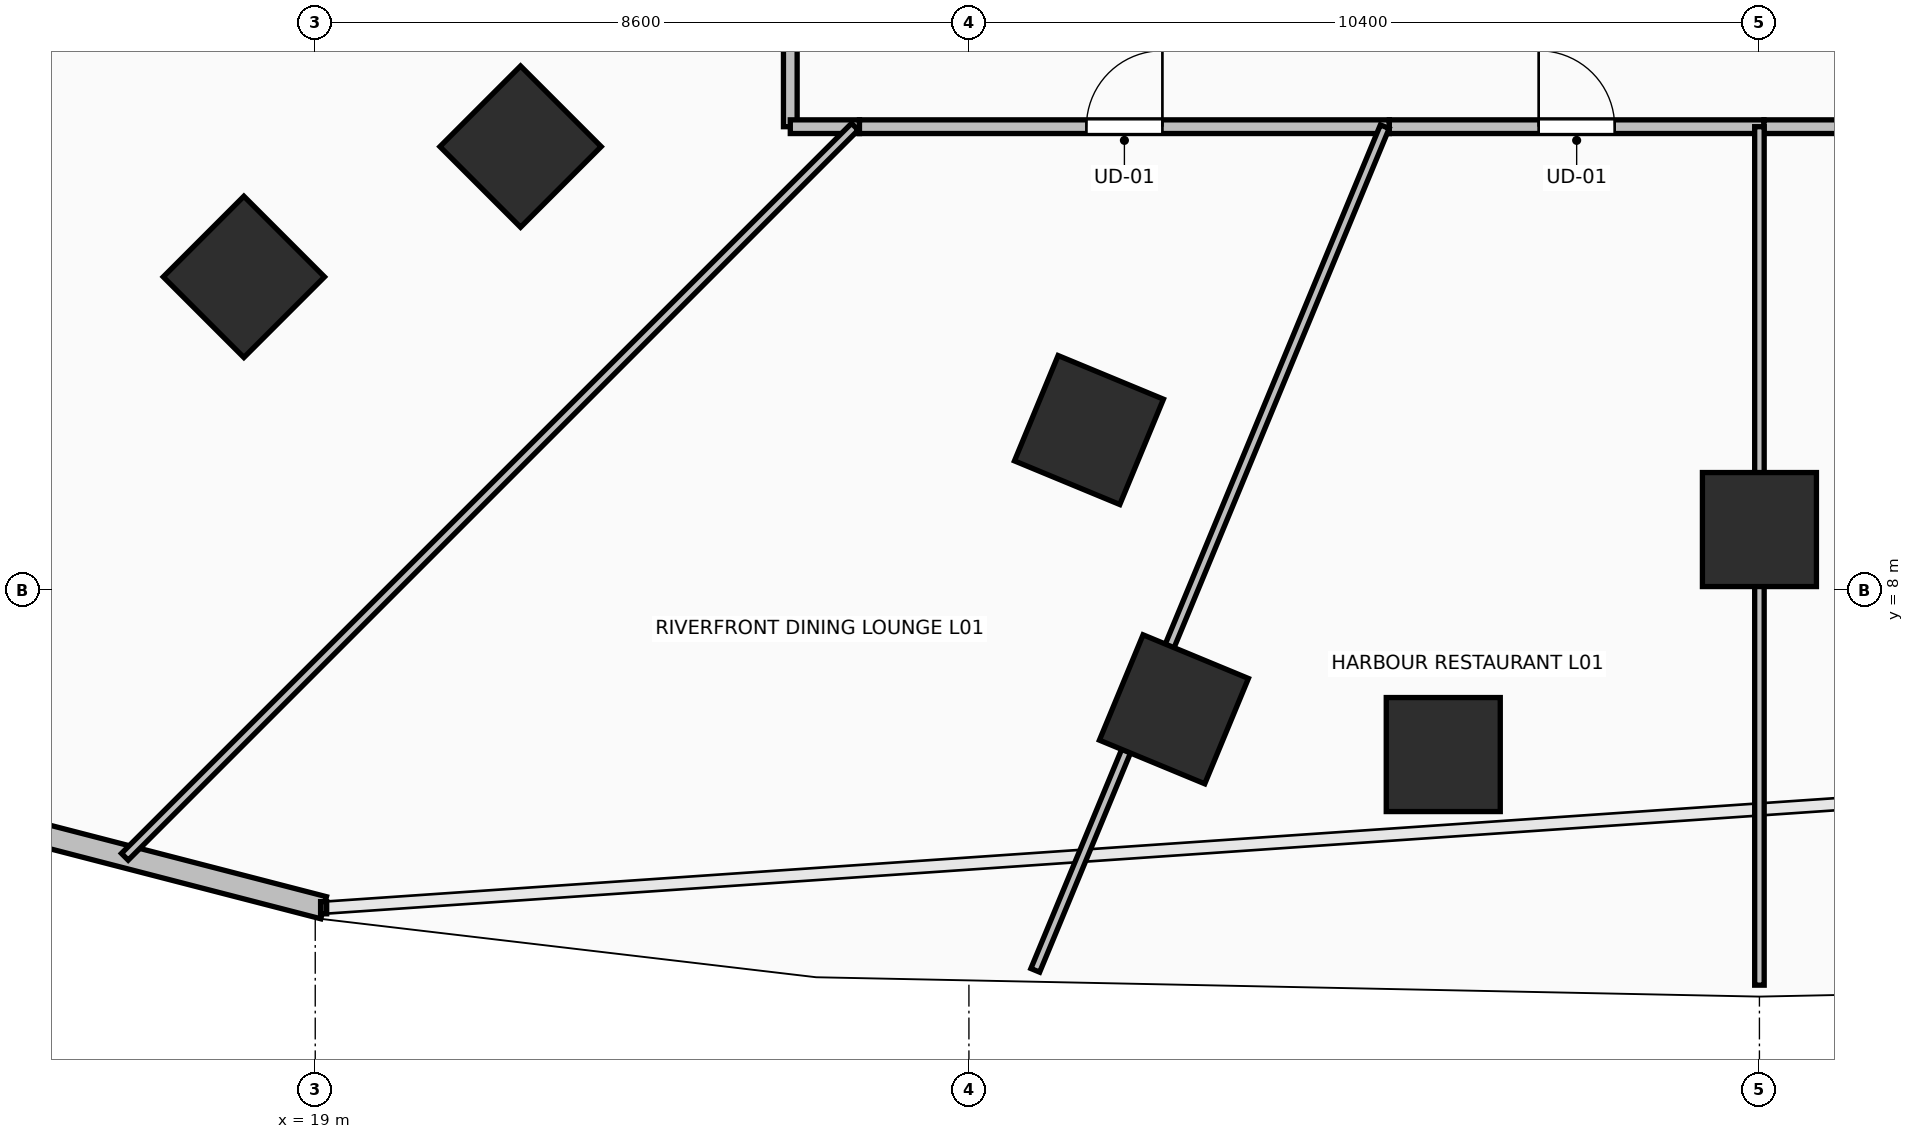
"""IFC4 building model, lengths in metres.
Left out: names, types, materials, properties, quantities, classifications, styles, units other than length and angle.
Written with IfcOpenShell. Run it as: python <this file> out.ifc"""

import sys

from ifc_helpers import new_model, si_unit, direction, frame, frame_2d, origin, origin_2d, place, context, subcontext, project, spatial, rectangle, extrude, element, fill, save


model = new_model("IFC4")
c1 = context("Model", 3, precision=1e-05, world=origin(), true_north=direction((0.0, 1.0)))
c2 = subcontext(c1, "Body", "Model", "MODEL_VIEW")
j1 = project(units=[si_unit("LENGTHUNIT", "METRE"), si_unit("PLANEANGLEUNIT", "RADIAN")], contexts=[c1])
p1 = place(None, origin())
s1 = spatial("IfcSite", under=j1, at=p1, CompositionType="ELEMENT")
p2 = place(p1, origin())
s2 = spatial("IfcBuilding", under=s1, at=p2, CompositionType="ELEMENT")
p3 = place(p2, frame((0.0, 0.0, 4.8)))
s3 = spatial("IfcBuildingStorey", under=s2, at=p3, CompositionType="ELEMENT", Elevation=4.8)
for number, where, z_axis, x_axis in (
    (1, (21.701, 13.838, 0.0), (0.0, 0.0, 1.0), (-0.707, -0.707, 0.0)),
    (2, (29.179, 10.109, 0.0), (0.0, 0.0, 1.0), (-0.383, -0.924, 0.0)),
    (3, (38.0, 8.8, 0.0), (0.0, 0.0, 1.0), (0.0, -1.0, 0.0)),
    (4, (18.061, 12.124, 0.0), (0.0, 0.0, 1.0), (-0.707, -0.707, 0.0)),
    (5, (30.297, 6.435, 0.0), (0.0, 0.0, 1.0), (-0.383, -0.924, 0.0)),
    (6, (33.84, 5.84, 0.0), (0.0, 0.0, 1.0), (0.0, -1.0, 0.0)),
):
    element("IfcColumn", number, at=place(p3, frame(where, z_axis=z_axis, x_axis=x_axis)), inside=s3, PredefinedType="COLUMN", context=c2, shape_type="SweptSolid", body=[
        extrude(rectangle(XDim=1.5, YDim=1.5, at=origin_2d()), origin(), (0.0, 0.0, 1.0), 4.8),
    ])
p4 = place(p3, frame((14.037, 5.136, 0.0), z_axis=(0.0, 0.0, 1.0), x_axis=(0.968182342492, -0.250245782556, 0.0)))
e7 = element("IfcWall", 7, at=p4, inside=s3, PredefinedType="STANDARD", context=c2, shape_type="SweptSolid", body=[
    extrude(rectangle(XDim=5.24, YDim=0.3, at=frame_2d((2.62, 0.0))), origin(), (0.0, 0.0, 1.0), 4.48),
])
p5 = place(p3, frame((25.25, 31.221, 0.0), z_axis=(0.0, 0.0, 1.0), x_axis=(0.0, -1.0, 0.0)))
e8 = element("IfcWall", 8, at=p5, inside=s3, PredefinedType="PARTITIONING", context=c2, shape_type="SweptSolid", body=[
    extrude(rectangle(XDim=17.121, YDim=0.18, at=frame_2d((8.561, 0.0))), origin(), (0.0, 0.0, 1.0), 3.672),
])
p6 = place(p5, frame((8.061, 0.0, 0.0)))
e9 = element("IfcOpeningElement", 9, at=p6, cuts=e8, PredefinedType="OPENING", context=c2, shape_type="SweptSolid", body=[
    extrude(rectangle(XDim=1.0, YDim=2.15, at=frame_2d((0.5, 1.075))), frame((0.0, 0.105, 0.0), z_axis=(0.0, -1.0, 0.0), x_axis=(1.0, 0.0, 0.0)), (0.0, 0.0, 1.0), 0.21),
])
p7 = place(p3, frame((25.25, 14.1, 0.0), z_axis=(0.0, 0.0, 1.0), x_axis=(1.0, 0.0, 0.0)))
e10 = element("IfcWall", 10, at=p7, inside=s3, PredefinedType="PARTITIONING", context=c2, shape_type="SweptSolid", body=[
    extrude(rectangle(XDim=0.91, YDim=0.18, at=frame_2d((0.455, 0.0))), origin(), (0.0, 0.0, 1.0), 4.126),
])
p8 = place(p3, frame((26.16, 14.1, 0.0), z_axis=(0.0, 0.0, 1.0), x_axis=(1.0, 0.0, 0.0)))
e11 = element("IfcWall", 11, at=p8, inside=s3, PredefinedType="PARTITIONING", context=c2, shape_type="SweptSolid", body=[
    extrude(rectangle(XDim=6.971, YDim=0.18, at=frame_2d((3.486, 0.0))), origin(), (0.0, 0.0, 1.0), 3.672),
])
p9 = place(p8, frame((2.986, 0.0, 0.0)))
e12 = element("IfcOpeningElement", 12, at=p9, cuts=e11, PredefinedType="OPENING", context=c2, shape_type="SweptSolid", body=[
    extrude(rectangle(XDim=1.0, YDim=2.15, at=frame_2d((0.5, 1.075))), frame((0.0, 0.105, 0.0), z_axis=(0.0, -1.0, 0.0), x_axis=(1.0, 0.0, 0.0)), (0.0, 0.0, 1.0), 0.21),
])
p10 = place(p3, frame((33.131, 14.1, 0.0), z_axis=(0.0, 0.0, 1.0), x_axis=(1.0, 0.0, 0.0)))
e13 = element("IfcWall", 13, at=p10, inside=s3, PredefinedType="PARTITIONING", context=c2, shape_type="SweptSolid", body=[
    extrude(rectangle(XDim=4.929, YDim=0.18, at=frame_2d((2.464, 0.0))), origin(), (0.0, 0.0, 1.0), 4.48),
])
p11 = place(p10, frame((1.965, 0.0, 0.0)))
e14 = element("IfcOpeningElement", 14, at=p11, cuts=e13, PredefinedType="OPENING", context=c2, shape_type="SweptSolid", body=[
    extrude(rectangle(XDim=1.0, YDim=2.15, at=frame_2d((0.5, 1.075))), frame((0.0, 0.105, 0.0), z_axis=(0.0, -1.0, 0.0), x_axis=(1.0, 0.0, 0.0)), (0.0, 0.0, 1.0), 0.21),
])
p12 = place(p3, frame((38.06, 14.1, 0.0), z_axis=(0.0, 0.0, 1.0), x_axis=(1.0, 0.0, 0.0)))
e15 = element("IfcWall", 15, at=p12, inside=s3, PredefinedType="PARTITIONING", context=c2, shape_type="SweptSolid", body=[
    extrude(rectangle(XDim=4.14, YDim=0.18, at=frame_2d((2.07, 0.0))), origin(), (0.0, 0.0, 1.0), 4.48),
])
p13 = place(p12, frame((1.57, 0.0, 0.0)))
e16 = element("IfcOpeningElement", 16, at=p13, cuts=e15, PredefinedType="OPENING", context=c2, shape_type="SweptSolid", body=[
    extrude(rectangle(XDim=1.0, YDim=2.15, at=frame_2d((0.5, 1.075))), frame((0.0, 0.105, 0.0), z_axis=(0.0, -1.0, 0.0), x_axis=(1.0, 0.0, 0.0)), (0.0, 0.0, 1.0), 0.21),
])
p14 = place(p3, frame((16.495, 4.495, 0.0), z_axis=(0.0, 0.0, 1.0), x_axis=(0.707106781187, 0.707106781187, 0.0)))
e17 = element("IfcWall", 17, at=p14, inside=s3, PredefinedType="PARTITIONING", context=c2, shape_type="SweptSolid", body=[
    extrude(rectangle(XDim=13.583, YDim=0.125, at=frame_2d((6.792, 0.0))), origin(), (0.0, 0.0, 1.0), 3.769),
])
p15 = place(p3, frame((28.473, 3.001, 0.0), z_axis=(0.0, 0.0, 1.0), x_axis=(0.382735867727, 0.92385781133, 0.0)))
e18 = element("IfcWall", 18, at=p15, inside=s3, PredefinedType="PARTITIONING", context=c2, shape_type="SweptSolid", body=[
    extrude(rectangle(XDim=12.014, YDim=0.125, at=frame_2d((6.007, 0.0))), origin(), (0.0, 0.0, 1.0), 3.672),
])
p16 = place(p3, frame((38.0, 2.806, 0.0), z_axis=(0.0, 0.0, 1.0), x_axis=(0.0, 1.0, 0.0)))
e19 = element("IfcWall", 19, at=p16, inside=s3, PredefinedType="PARTITIONING", context=c2, shape_type="SweptSolid", body=[
    extrude(rectangle(XDim=11.294, YDim=0.125, at=frame_2d((5.647, 0.0))), origin(), (0.0, 0.0, 1.0), 3.672),
])
p17 = place(p9, origin())
e20 = element("IfcDoor", 20, at=p17, inside=s3, OperationType="SINGLE_SWING_RIGHT", PredefinedType="DOOR", context=c2, shape_type="SweptSolid", body=[
    extrude(rectangle(XDim=1.0, YDim=2.15, at=frame_2d((0.5, 1.075))), frame((0.0, 0.025, 0.0), z_axis=(0.0, -1.0, 0.0), x_axis=(1.0, 0.0, 0.0)), (0.0, 0.0, 1.0), 0.05),
])
fill(e12, e20)
p18 = place(p11, origin())
e21 = element("IfcDoor", 21, at=p18, inside=s3, OperationType="SINGLE_SWING_LEFT", PredefinedType="DOOR", context=c2, shape_type="SweptSolid", body=[
    extrude(rectangle(XDim=1.0, YDim=2.15, at=frame_2d((0.5, 1.075))), frame((0.0, 0.025, 0.0), z_axis=(0.0, -1.0, 0.0), x_axis=(1.0, 0.0, 0.0)), (0.0, 0.0, 1.0), 0.05),
])
fill(e14, e21)
save(model, sys.argv[1])
